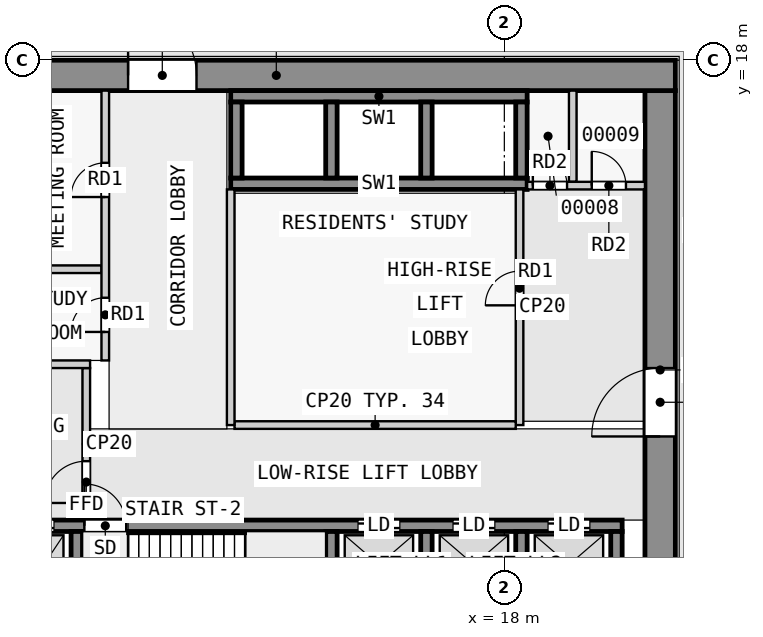
"""IFC4 building model, lengths in metres.
Left out: names, types, materials, properties, quantities, classifications, styles, units other than length and angle.
Written with IfcOpenShell. Run it as: python <this file> out.ifc"""

import sys

from ifc_helpers import new_model, si_unit, direction, frame, frame_2d, origin, place, context, subcontext, project, spatial, rectangle, extrude, element, fill, save


model = new_model("IFC4")
c1 = context("Model", 3, precision=1e-05, world=origin(), true_north=direction((0.0, 1.0)))
c2 = subcontext(c1, "Body", "Model", "MODEL_VIEW")
j1 = project(units=[si_unit("LENGTHUNIT", "METRE"), si_unit("PLANEANGLEUNIT", "RADIAN")], contexts=[c1])
p1 = place(None, origin())
s1 = spatial("IfcSite", under=j1, at=p1, CompositionType="ELEMENT")
p2 = place(p1, origin())
s2 = spatial("IfcBuilding", under=s1, at=p2, CompositionType="ELEMENT")
p3 = place(p2, origin())
s3 = spatial("IfcBuildingStorey", under=s2, at=p3, CompositionType="ELEMENT", Elevation=0.0)
p4 = place(p3, frame((1.5, 17.6, 0.0), z_axis=(0.0, 0.0, 1.0), x_axis=(1.0, 0.0, 0.0)))
e1 = element("IfcWall", 1, at=p4, inside=s3, PredefinedType="SHEAR", context=c2, shape_type="SweptSolid", body=[
    extrude(rectangle(XDim=21.0, YDim=0.8, at=frame_2d((10.5, 0.0))), origin(), (0.0, 0.0, 1.0), 7.65),
])
p5 = place(p4, frame((6.6, 0.0, 0.0)))
e2 = element("IfcOpeningElement", 2, at=p5, cuts=e1, PredefinedType="OPENING", context=c2, shape_type="SweptSolid", body=[
    extrude(rectangle(XDim=1.8, YDim=2.1, at=frame_2d((0.9, 1.05))), frame((0.0, 0.41, 0.0), z_axis=(0.0, -1.0, 0.0), x_axis=(1.0, 0.0, 0.0)), (0.0, 0.0, 1.0), 0.82),
])
p6 = place(p3, frame((22.1, 2.5, 0.0), z_axis=(0.0, 0.0, 1.0), x_axis=(0.0, 1.0, 0.0)))
e3 = element("IfcWall", 3, at=p6, inside=s3, PredefinedType="SHEAR", context=c2, shape_type="SweptSolid", body=[
    extrude(rectangle(XDim=14.7, YDim=0.8, at=frame_2d((7.35, 0.0))), origin(), (0.0, 0.0, 1.0), 7.65),
])
p7 = place(p6, frame((5.6, 0.0, 0.0)))
e4 = element("IfcOpeningElement", 4, at=p7, cuts=e3, PredefinedType="OPENING", context=c2, shape_type="SweptSolid", body=[
    extrude(rectangle(XDim=1.8, YDim=2.1, at=frame_2d((0.9, 1.05))), frame((0.0, 0.41, 0.0), z_axis=(0.0, -1.0, 0.0), x_axis=(1.0, 0.0, 0.0)), (0.0, 0.0, 1.0), 0.82),
])
for number, where, z_axis, x_axis in (
    (5, (6.75, 2.8, 0.0), (0.0, 0.0, 1.0), (0.0, 1.0, 0.0)),
    (6, (13.45, 2.8, 0.0), (0.0, 0.0, 1.0), (0.0, 1.0, 0.0)),
    (7, (15.95, 2.8, 0.0), (0.0, 0.0, 1.0), (0.0, 1.0, 0.0)),
    (8, (18.45, 2.8, 0.0), (0.0, 0.0, 1.0), (0.0, 1.0, 0.0)),
    (9, (20.95, 2.8, 0.0), (0.0, 0.0, 1.0), (0.0, 1.0, 0.0)),
):
    element("IfcWall", number, at=place(p3, frame(where, z_axis=z_axis, x_axis=x_axis)), inside=s3, PredefinedType="SHEAR", context=c2, shape_type="SweptSolid", body=[
        extrude(rectangle(XDim=2.8, YDim=0.3, at=frame_2d((1.4, 0.0))), origin(), (0.0, 0.0, 1.0), 7.65),
    ])
p8 = place(p3, frame((2.3, 5.75, 0.0), z_axis=(0.0, 0.0, 1.0), x_axis=(1.0, 0.0, 0.0)))
e10 = element("IfcWall", 10, at=p8, inside=s3, PredefinedType="SHEAR", context=c2, shape_type="SweptSolid", body=[
    extrude(rectangle(XDim=18.8, YDim=0.3, at=frame_2d((9.4, 0.0))), origin(), (0.0, 0.0, 1.0), 7.65),
])
p9 = place(p8, frame((4.65, 0.0, 0.0)))
e11 = element("IfcOpeningElement", 11, at=p9, cuts=e10, PredefinedType="OPENING", context=c2, shape_type="SweptSolid", body=[
    extrude(rectangle(XDim=1.1, YDim=2.1, at=frame_2d((0.55, 1.05))), frame((0.0, 0.16, 0.0), z_axis=(0.0, -1.0, 0.0), x_axis=(1.0, 0.0, 0.0)), (0.0, 0.0, 1.0), 0.32),
])
p10 = place(p8, frame((0.45, 0.0, 0.0)))
e12 = element("IfcOpeningElement", 12, at=p10, cuts=e10, PredefinedType="OPENING", context=c2, shape_type="SweptSolid", body=[
    extrude(rectangle(XDim=1.1, YDim=2.1, at=frame_2d((0.55, 1.05))), frame((0.0, 0.16, 0.0), z_axis=(0.0, -1.0, 0.0), x_axis=(1.0, 0.0, 0.0)), (0.0, 0.0, 1.0), 0.32),
])
p11 = place(p8, frame((2.75, 0.0, 0.0)))
e13 = element("IfcOpeningElement", 13, at=p11, cuts=e10, PredefinedType="OPENING", context=c2, shape_type="SweptSolid", body=[
    extrude(rectangle(XDim=1.1, YDim=2.1, at=frame_2d((0.55, 1.05))), frame((0.0, 0.16, 0.0), z_axis=(0.0, -1.0, 0.0), x_axis=(1.0, 0.0, 0.0)), (0.0, 0.0, 1.0), 0.32),
])
p12 = place(p8, frame((11.85, 0.0, 0.0)))
e14 = element("IfcOpeningElement", 14, at=p12, cuts=e10, PredefinedType="OPENING", context=c2, shape_type="SweptSolid", body=[
    extrude(rectangle(XDim=1.1, YDim=2.1, at=frame_2d((0.55, 1.05))), frame((0.0, 0.16, 0.0), z_axis=(0.0, -1.0, 0.0), x_axis=(1.0, 0.0, 0.0)), (0.0, 0.0, 1.0), 0.32),
])
p13 = place(p8, frame((14.35, 0.0, 0.0)))
e15 = element("IfcOpeningElement", 15, at=p13, cuts=e10, PredefinedType="OPENING", context=c2, shape_type="SweptSolid", body=[
    extrude(rectangle(XDim=1.1, YDim=2.1, at=frame_2d((0.55, 1.05))), frame((0.0, 0.16, 0.0), z_axis=(0.0, -1.0, 0.0), x_axis=(1.0, 0.0, 0.0)), (0.0, 0.0, 1.0), 0.32),
])
p14 = place(p8, frame((16.85, 0.0, 0.0)))
e16 = element("IfcOpeningElement", 16, at=p14, cuts=e10, PredefinedType="OPENING", context=c2, shape_type="SweptSolid", body=[
    extrude(rectangle(XDim=1.1, YDim=2.1, at=frame_2d((0.55, 1.05))), frame((0.0, 0.16, 0.0), z_axis=(0.0, -1.0, 0.0), x_axis=(1.0, 0.0, 0.0)), (0.0, 0.0, 1.0), 0.32),
])
for number, where, z_axis, x_axis in (
    (17, (10.8, 17.05, 0.0), (0.0, 0.0, 1.0), (1.0, 0.0, 0.0)),
    (18, (10.8, 14.75, 0.0), (0.0, 0.0, 1.0), (1.0, 0.0, 0.0)),
):
    element("IfcWall", number, at=place(p3, frame(where, z_axis=z_axis, x_axis=x_axis)), inside=s3, PredefinedType="SHEAR", context=c2, shape_type="SweptSolid", body=[
        extrude(rectangle(XDim=7.8, YDim=0.3, at=frame_2d((3.9, 0.0))), origin(), (0.0, 0.0, 1.0), 7.65),
    ])
for number, where, z_axis, x_axis in (
    (19, (10.95, 14.9, 0.0), (0.0, 0.0, 1.0), (0.0, 1.0, 0.0)),
    (20, (13.45, 14.9, 0.0), (0.0, 0.0, 1.0), (0.0, 1.0, 0.0)),
    (21, (15.95, 14.9, 0.0), (0.0, 0.0, 1.0), (0.0, 1.0, 0.0)),
    (22, (18.45, 14.9, 0.0), (0.0, 0.0, 1.0), (0.0, 1.0, 0.0)),
):
    element("IfcWall", number, at=place(p3, frame(where, z_axis=z_axis, x_axis=x_axis)), inside=s3, PredefinedType="SHEAR", context=c2, shape_type="SweptSolid", body=[
        extrude(rectangle(XDim=2.0, YDim=0.3, at=frame_2d((1.0, 0.0))), origin(), (0.0, 0.0, 1.0), 7.65),
    ])
p15 = place(p3, frame((7.0, 5.9, 0.0), z_axis=(0.0, 0.0, 1.0), x_axis=(0.0, 1.0, 0.0)))
e23 = element("IfcWall", 23, at=p15, inside=s3, PredefinedType="PARTITIONING", context=c2, shape_type="SweptSolid", body=[
    extrude(rectangle(XDim=4.0, YDim=0.2, at=frame_2d((2.0, 0.0))), origin(), (0.0, 0.0, 1.0), 7.65),
])
p16 = place(p15, frame((0.45, 0.0, 0.0)))
e24 = element("IfcOpeningElement", 24, at=p16, cuts=e23, PredefinedType="OPENING", context=c2, shape_type="SweptSolid", body=[
    extrude(rectangle(XDim=1.1, YDim=2.1, at=frame_2d((0.55, 1.05))), frame((0.0, 0.11, 0.0), z_axis=(0.0, -1.0, 0.0), x_axis=(1.0, 0.0, 0.0)), (0.0, 0.0, 1.0), 0.22),
])
p17 = place(p3, frame((5.15, 10.0, 0.0), z_axis=(0.0, 0.0, 1.0), x_axis=(1.0, 0.0, 0.0)))
e25 = element("IfcWall", 25, at=p17, inside=s3, PredefinedType="PARTITIONING", context=c2, shape_type="SweptSolid", body=[
    extrude(rectangle(XDim=1.95, YDim=0.2, at=frame_2d((0.975, 0.0))), origin(), (0.0, 0.0, 1.0), 7.65),
])
p18 = place(p3, frame((10.8, 8.4, 0.0), z_axis=(0.0, 0.0, 1.0), x_axis=(0.0, 1.0, 0.0)))
e26 = element("IfcWall", 26, at=p18, inside=s3, PredefinedType="PARTITIONING", context=c2, shape_type="SweptSolid", body=[
    extrude(rectangle(XDim=6.2, YDim=0.2, at=frame_2d((3.1, 0.0))), origin(), (0.0, 0.0, 1.0), 7.65),
])
p19 = place(p3, frame((10.9, 8.4, 0.0), z_axis=(0.0, 0.0, 1.0), x_axis=(1.0, 0.0, 0.0)))
e27 = element("IfcWall", 27, at=p19, inside=s3, PredefinedType="PARTITIONING", context=c2, shape_type="SweptSolid", body=[
    extrude(rectangle(XDim=7.4, YDim=0.2, at=frame_2d((3.7, 0.0))), origin(), (0.0, 0.0, 1.0), 7.65),
])
p20 = place(p3, frame((18.4, 8.4, 0.0), z_axis=(0.0, 0.0, 1.0), x_axis=(0.0, 1.0, 0.0)))
e28 = element("IfcWall", 28, at=p20, inside=s3, PredefinedType="PARTITIONING", context=c2, shape_type="SweptSolid", body=[
    extrude(rectangle(XDim=6.2, YDim=0.2, at=frame_2d((3.1, 0.0))), origin(), (0.0, 0.0, 1.0), 7.65),
])
p21 = place(p20, frame((3.15, 0.0, 0.0)))
e29 = element("IfcOpeningElement", 29, at=p21, cuts=e28, PredefinedType="OPENING", context=c2, shape_type="SweptSolid", body=[
    extrude(rectangle(XDim=0.9, YDim=2.1, at=frame_2d((0.45, 1.05))), frame((0.0, 0.11, 0.0), z_axis=(0.0, -1.0, 0.0), x_axis=(1.0, 0.0, 0.0)), (0.0, 0.0, 1.0), 0.22),
])
p22 = place(p3, frame((7.5, 10.1, 0.0), z_axis=(0.0, 0.0, 1.0), x_axis=(0.0, 1.0, 0.0)))
e30 = element("IfcWall", 30, at=p22, inside=s3, PredefinedType="PARTITIONING", context=c2, shape_type="SweptSolid", body=[
    extrude(rectangle(XDim=7.1, YDim=0.2, at=frame_2d((3.55, 0.0))), origin(), (0.0, 0.0, 1.0), 7.65),
])
p23 = place(p22, frame((0.75, 0.0, 0.0)))
e31 = element("IfcOpeningElement", 31, at=p23, cuts=e30, PredefinedType="OPENING", context=c2, shape_type="SweptSolid", body=[
    extrude(rectangle(XDim=0.9, YDim=2.1, at=frame_2d((0.45, 1.05))), frame((0.0, 0.11, 0.0), z_axis=(0.0, -1.0, 0.0), x_axis=(1.0, 0.0, 0.0)), (0.0, 0.0, 1.0), 0.22),
])
p24 = place(p22, frame((4.3, 0.0, 0.0)))
e32 = element("IfcOpeningElement", 32, at=p24, cuts=e30, PredefinedType="OPENING", context=c2, shape_type="SweptSolid", body=[
    extrude(rectangle(XDim=0.9, YDim=2.1, at=frame_2d((0.45, 1.05))), frame((0.0, 0.11, 0.0), z_axis=(0.0, -1.0, 0.0), x_axis=(1.0, 0.0, 0.0)), (0.0, 0.0, 1.0), 0.22),
])
p25 = place(p3, frame((5.15, 12.5, 0.0), z_axis=(0.0, 0.0, 1.0), x_axis=(1.0, 0.0, 0.0)))
e33 = element("IfcWall", 33, at=p25, inside=s3, PredefinedType="PARTITIONING", context=c2, shape_type="SweptSolid", body=[
    extrude(rectangle(XDim=2.25, YDim=0.2, at=frame_2d((1.125, 0.0))), origin(), (0.0, 0.0, 1.0), 7.65),
])
p26 = place(p3, frame((18.6, 14.7, 0.0), z_axis=(0.0, 0.0, 1.0), x_axis=(1.0, 0.0, 0.0)))
e34 = element("IfcWall", 34, at=p26, inside=s3, PredefinedType="PARTITIONING", context=c2, shape_type="SweptSolid", body=[
    extrude(rectangle(XDim=3.1, YDim=0.2, at=frame_2d((1.55, 0.0))), origin(), (0.0, 0.0, 1.0), 7.65),
])
p27 = place(p26, frame((0.15, 0.0, 0.0)))
e35 = element("IfcOpeningElement", 35, at=p27, cuts=e34, PredefinedType="OPENING", context=c2, shape_type="SweptSolid", body=[
    extrude(rectangle(XDim=0.9, YDim=2.1, at=frame_2d((0.45, 1.05))), frame((0.0, 0.11, 0.0), z_axis=(0.0, -1.0, 0.0), x_axis=(1.0, 0.0, 0.0)), (0.0, 0.0, 1.0), 0.22),
])
p28 = place(p26, frame((1.7, 0.0, 0.0)))
e36 = element("IfcOpeningElement", 36, at=p28, cuts=e34, PredefinedType="OPENING", context=c2, shape_type="SweptSolid", body=[
    extrude(rectangle(XDim=0.9, YDim=2.1, at=frame_2d((0.45, 1.05))), frame((0.0, 0.11, 0.0), z_axis=(0.0, -1.0, 0.0), x_axis=(1.0, 0.0, 0.0)), (0.0, 0.0, 1.0), 0.22),
])
p29 = place(p3, frame((19.8, 14.8, 0.0), z_axis=(0.0, 0.0, 1.0), x_axis=(0.0, 1.0, 0.0)))
e37 = element("IfcWall", 37, at=p29, inside=s3, PredefinedType="PARTITIONING", context=c2, shape_type="SweptSolid", body=[
    extrude(rectangle(XDim=2.4, YDim=0.2, at=frame_2d((1.2, 0.0))), origin(), (0.0, 0.0, 1.0), 7.65),
])
p30 = place(p16, origin())
e38 = element("IfcDoor", 38, at=p30, inside=s3, OperationType="SINGLE_SWING_LEFT", PredefinedType="DOOR", context=c2, shape_type="SweptSolid", body=[
    extrude(rectangle(XDim=1.1, YDim=2.1, at=frame_2d((0.55, 1.05))), frame((0.0, 0.025, 0.0), z_axis=(0.0, -1.0, 0.0), x_axis=(1.0, 0.0, 0.0)), (0.0, 0.0, 1.0), 0.05),
])
fill(e24, e38)
p31 = place(p21, origin())
e39 = element("IfcDoor", 39, at=p31, inside=s3, OperationType="SINGLE_SWING_LEFT", PredefinedType="DOOR", context=c2, shape_type="SweptSolid", body=[
    extrude(rectangle(XDim=0.9, YDim=2.1, at=frame_2d((0.45, 1.05))), frame((0.0, 0.025, 0.0), z_axis=(0.0, -1.0, 0.0), x_axis=(1.0, 0.0, 0.0)), (0.0, 0.0, 1.0), 0.05),
])
fill(e29, e39)
p32 = place(p9, origin())
e40 = element("IfcDoor", 40, at=p32, inside=s3, OperationType="SINGLE_SWING_LEFT", PredefinedType="DOOR", context=c2, shape_type="SweptSolid", body=[
    extrude(rectangle(XDim=1.1, YDim=2.1, at=frame_2d((0.55, 1.05))), frame((0.0, 0.025, 0.0), z_axis=(0.0, -1.0, 0.0), x_axis=(1.0, 0.0, 0.0)), (0.0, 0.0, 1.0), 0.05),
])
fill(e11, e40)
p33 = place(p11, origin())
e41 = element("IfcDoor", 41, at=p33, inside=s3, OperationType="DOUBLE_DOOR_SLIDING", PredefinedType="DOOR", context=c2, shape_type="SweptSolid", body=[
    extrude(rectangle(XDim=1.1, YDim=2.1, at=frame_2d((0.55, 1.05))), frame((0.0, 0.025, 0.0), z_axis=(0.0, -1.0, 0.0), x_axis=(1.0, 0.0, 0.0)), (0.0, 0.0, 1.0), 0.05),
])
fill(e13, e41)
p34 = place(p12, origin())
e42 = element("IfcDoor", 42, at=p34, inside=s3, OperationType="DOUBLE_DOOR_SLIDING", PredefinedType="DOOR", context=c2, shape_type="SweptSolid", body=[
    extrude(rectangle(XDim=1.1, YDim=2.1, at=frame_2d((0.55, 1.05))), frame((0.0, 0.025, 0.0), z_axis=(0.0, -1.0, 0.0), x_axis=(1.0, 0.0, 0.0)), (0.0, 0.0, 1.0), 0.05),
])
fill(e14, e42)
p35 = place(p13, origin())
e43 = element("IfcDoor", 43, at=p35, inside=s3, OperationType="DOUBLE_DOOR_SLIDING", PredefinedType="DOOR", context=c2, shape_type="SweptSolid", body=[
    extrude(rectangle(XDim=1.1, YDim=2.1, at=frame_2d((0.55, 1.05))), frame((0.0, 0.025, 0.0), z_axis=(0.0, -1.0, 0.0), x_axis=(1.0, 0.0, 0.0)), (0.0, 0.0, 1.0), 0.05),
])
fill(e15, e43)
p36 = place(p14, origin())
e44 = element("IfcDoor", 44, at=p36, inside=s3, OperationType="DOUBLE_DOOR_SLIDING", PredefinedType="DOOR", context=c2, shape_type="SweptSolid", body=[
    extrude(rectangle(XDim=1.1, YDim=2.1, at=frame_2d((0.55, 1.05))), frame((0.0, 0.025, 0.0), z_axis=(0.0, -1.0, 0.0), x_axis=(1.0, 0.0, 0.0)), (0.0, 0.0, 1.0), 0.05),
])
fill(e16, e44)
p37 = place(p7, origin())
e45 = element("IfcDoor", 45, at=p37, inside=s3, OperationType="DOUBLE_DOOR_SINGLE_SWING", PredefinedType="DOOR", context=c2, shape_type="SweptSolid", body=[
    extrude(rectangle(XDim=1.8, YDim=2.1, at=frame_2d((0.9, 1.05))), frame((0.0, 0.025, 0.0), z_axis=(0.0, -1.0, 0.0), x_axis=(1.0, 0.0, 0.0)), (0.0, 0.0, 1.0), 0.05),
])
fill(e4, e45)
p38 = place(p5, origin())
e46 = element("IfcDoor", 46, at=p38, inside=s3, OperationType="DOUBLE_DOOR_SINGLE_SWING", PredefinedType="DOOR", context=c2, shape_type="SweptSolid", body=[
    extrude(rectangle(XDim=1.8, YDim=2.1, at=frame_2d((0.9, 1.05))), frame((0.0, 0.025, 0.0), z_axis=(0.0, -1.0, 0.0), x_axis=(1.0, 0.0, 0.0)), (0.0, 0.0, 1.0), 0.05),
])
fill(e2, e46)
p39 = place(p23, origin())
e47 = element("IfcDoor", 47, at=p39, inside=s3, OperationType="SINGLE_SWING_RIGHT", PredefinedType="DOOR", context=c2, shape_type="SweptSolid", body=[
    extrude(rectangle(XDim=0.9, YDim=2.1, at=frame_2d((0.45, 1.05))), frame((0.0, 0.025, 0.0), z_axis=(0.0, -1.0, 0.0), x_axis=(1.0, 0.0, 0.0)), (0.0, 0.0, 1.0), 0.05),
])
fill(e31, e47)
p40 = place(p24, origin())
e48 = element("IfcDoor", 48, at=p40, inside=s3, OperationType="SINGLE_SWING_RIGHT", PredefinedType="DOOR", context=c2, shape_type="SweptSolid", body=[
    extrude(rectangle(XDim=0.9, YDim=2.1, at=frame_2d((0.45, 1.05))), frame((0.0, 0.025, 0.0), z_axis=(0.0, -1.0, 0.0), x_axis=(1.0, 0.0, 0.0)), (0.0, 0.0, 1.0), 0.05),
])
fill(e32, e48)
p41 = place(p27, origin())
e49 = element("IfcDoor", 49, at=p41, inside=s3, OperationType="SINGLE_SWING_LEFT", PredefinedType="DOOR", context=c2, shape_type="SweptSolid", body=[
    extrude(rectangle(XDim=0.9, YDim=2.1, at=frame_2d((0.45, 1.05))), frame((0.0, 0.025, 0.0), z_axis=(0.0, -1.0, 0.0), x_axis=(1.0, 0.0, 0.0)), (0.0, 0.0, 1.0), 0.05),
])
fill(e35, e49)
p42 = place(p28, origin())
e50 = element("IfcDoor", 50, at=p42, inside=s3, OperationType="SINGLE_SWING_LEFT", PredefinedType="DOOR", context=c2, shape_type="SweptSolid", body=[
    extrude(rectangle(XDim=0.9, YDim=2.1, at=frame_2d((0.45, 1.05))), frame((0.0, 0.025, 0.0), z_axis=(0.0, -1.0, 0.0), x_axis=(1.0, 0.0, 0.0)), (0.0, 0.0, 1.0), 0.05),
])
fill(e36, e50)
save(model, sys.argv[1])
